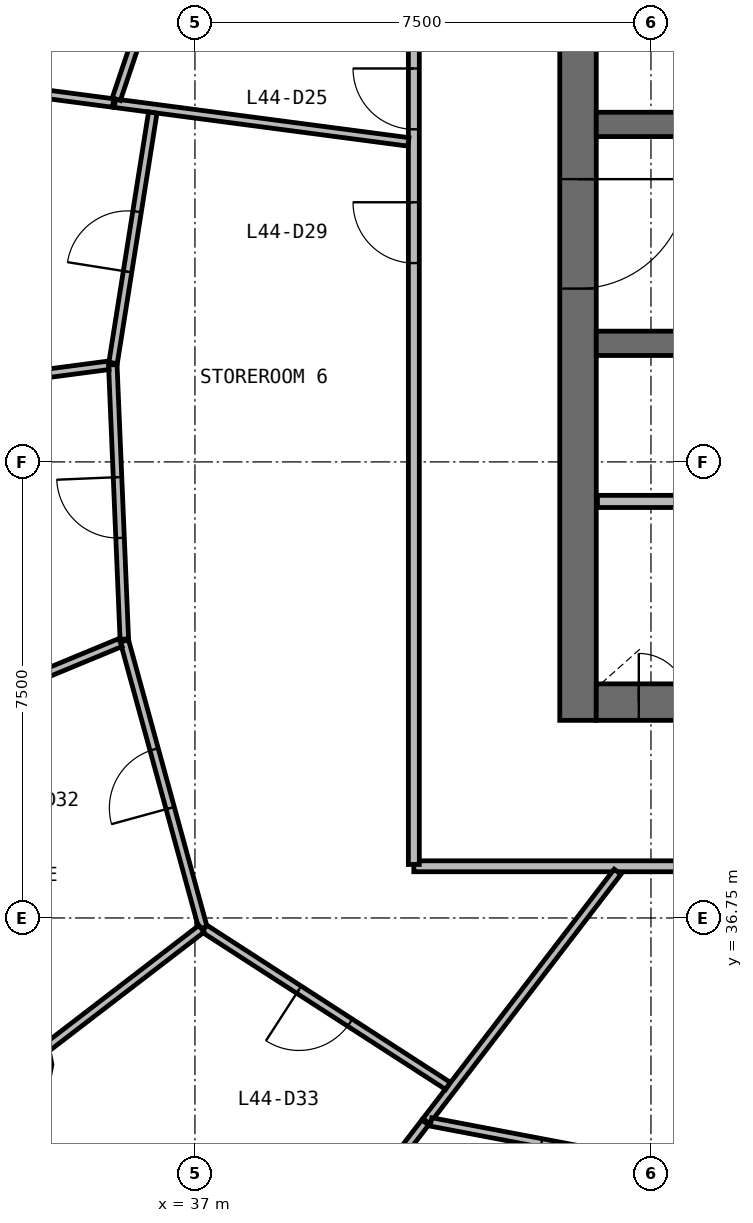
"""IFC4 building model, lengths in metres.
Left out: names, types, materials, properties, quantities, classifications, styles, units other than length and angle.
Written with IfcOpenShell. Run it as: python <this file> out.ifc"""

import sys

from ifc_helpers import new_model, si_unit, direction, frame, frame_2d, origin, place, context, subcontext, project, spatial, rectangle, extrude, source, transform, mapped, element, fill, save


model = new_model("IFC4")
c1 = context("Model", 3, precision=1e-05, world=origin(), true_north=direction((0.0, 1.0)))
c2 = subcontext(c1, "Body", "Model", "MODEL_VIEW")
j1 = project(units=[si_unit("LENGTHUNIT", "METRE"), si_unit("PLANEANGLEUNIT", "RADIAN")], contexts=[c1])
p1 = place(None, origin())
s1 = spatial("IfcSite", under=j1, at=p1, CompositionType="ELEMENT")
p2 = place(p1, origin())
s2 = spatial("IfcBuilding", under=s1, at=p2, CompositionType="ELEMENT")
p3 = place(p2, frame((0.0, 0.0, 183.8)))
s3 = spatial("IfcBuildingStorey", under=s2, at=p3, CompositionType="ELEMENT", Elevation=183.8)
p4 = place(p3, frame((43.3, 56.0, 0.0), z_axis=(0.0, 0.0, 1.0), x_axis=(0.0, -1.0, 0.0)))
e1 = element("IfcWall", 1, at=p4, inside=s3, PredefinedType="SHEAR", context=c2, shape_type="SweptSolid", body=[
    extrude(rectangle(XDim=16.0, YDim=0.6, at=frame_2d((8.0, 0.0))), origin(), (0.0, 0.0, 1.0), 3.9),
])
p5 = place(p4, frame((7.1, 0.0, 0.0)))
e2 = element("IfcOpeningElement", 2, at=p5, cuts=e1, PredefinedType="OPENING", context=c2, shape_type="SweptSolid", body=[
    extrude(rectangle(XDim=1.8, YDim=2.1, at=frame_2d((0.9, 1.05))), frame((0.0, 0.31, 0.0), z_axis=(0.0, -1.0, 0.0), x_axis=(1.0, 0.0, 0.0)), (0.0, 0.0, 1.0), 0.62),
])
p6 = place(p3, frame((43.6, 40.3, 0.0), z_axis=(0.0, 0.0, 1.0), x_axis=(1.0, 0.0, 0.0)))
e3 = element("IfcWall", 3, at=p6, inside=s3, PredefinedType="SHEAR", context=c2, shape_type="SweptSolid", body=[
    extrude(rectangle(XDim=16.8, YDim=0.6, at=frame_2d((8.4, 0.0))), origin(), (0.0, 0.0, 1.0), 3.9),
])
p7 = place(p6, frame((10.3, 0.0, 0.0)))
e4 = element("IfcOpeningElement", 4, at=p7, cuts=e3, PredefinedType="OPENING", context=c2, shape_type="SweptSolid", body=[
    extrude(rectangle(XDim=1.2, YDim=2.1, at=frame_2d((0.6, 1.05))), frame((0.0, 0.31, 0.0), z_axis=(0.0, -1.0, 0.0), x_axis=(1.0, 0.0, 0.0)), (0.0, 0.0, 1.0), 0.62),
])
p8 = place(p6, frame((7.25, 0.0, 0.0)))
e5 = element("IfcOpeningElement", 5, at=p8, cuts=e3, PredefinedType="OPENING", context=c2, shape_type="SweptSolid", body=[
    extrude(rectangle(XDim=1.1, YDim=2.1, at=frame_2d((0.55, 1.05))), frame((0.0, 0.31, 0.0), z_axis=(0.0, -1.0, 0.0), x_axis=(1.0, 0.0, 0.0)), (0.0, 0.0, 1.0), 0.62),
])
p9 = place(p6, frame((0.7, 0.0, 0.0)))
e6 = element("IfcOpeningElement", 6, at=p9, cuts=e3, PredefinedType="OPENING", context=c2, shape_type="SweptSolid", body=[
    extrude(rectangle(XDim=0.8, YDim=2.1, at=frame_2d((0.4, 1.05))), frame((0.0, 0.31, 0.0), z_axis=(0.0, -1.0, 0.0), x_axis=(1.0, 0.0, 0.0)), (0.0, 0.0, 1.0), 0.62),
])
p10 = place(p3, frame((43.6, 49.8, 0.0), z_axis=(0.0, 0.0, 1.0), x_axis=(1.0, 0.0, 0.0)))
e7 = element("IfcWall", 7, at=p10, inside=s3, PredefinedType="SHEAR", context=c2, shape_type="SweptSolid", body=[
    extrude(rectangle(XDim=16.8, YDim=0.4, at=frame_2d((8.4, 0.0))), origin(), (0.0, 0.0, 1.0), 3.9),
])
p11 = place(p10, frame((9.8, 0.0, 0.0)))
e8 = element("IfcOpeningElement", 8, at=p11, cuts=e7, PredefinedType="OPENING", context=c2, shape_type="SweptSolid", body=[
    extrude(rectangle(XDim=1.1, YDim=2.1, at=frame_2d((0.55, 1.05))), frame((0.0, 0.21, 0.0), z_axis=(0.0, -1.0, 0.0), x_axis=(1.0, 0.0, 0.0)), (0.0, 0.0, 1.0), 0.42),
])
p12 = place(p10, frame((12.3, 0.0, 0.0)))
e9 = element("IfcOpeningElement", 9, at=p12, cuts=e7, PredefinedType="OPENING", context=c2, shape_type="SweptSolid", body=[
    extrude(rectangle(XDim=1.1, YDim=2.1, at=frame_2d((0.55, 1.05))), frame((0.0, 0.21, 0.0), z_axis=(0.0, -1.0, 0.0), x_axis=(1.0, 0.0, 0.0)), (0.0, 0.0, 1.0), 0.42),
])
p13 = place(p10, frame((14.8, 0.0, 0.0)))
e10 = element("IfcOpeningElement", 10, at=p13, cuts=e7, PredefinedType="OPENING", context=c2, shape_type="SweptSolid", body=[
    extrude(rectangle(XDim=1.1, YDim=2.1, at=frame_2d((0.55, 1.05))), frame((0.0, 0.21, 0.0), z_axis=(0.0, -1.0, 0.0), x_axis=(1.0, 0.0, 0.0)), (0.0, 0.0, 1.0), 0.42),
])
p14 = place(p10, frame((4.45, 0.0, 0.0)))
e11 = element("IfcOpeningElement", 11, at=p14, cuts=e7, PredefinedType="OPENING", context=c2, shape_type="SweptSolid", body=[
    extrude(rectangle(XDim=0.9, YDim=2.1, at=frame_2d((0.45, 1.05))), frame((0.0, 0.21, 0.0), z_axis=(0.0, -1.0, 0.0), x_axis=(1.0, 0.0, 0.0)), (0.0, 0.0, 1.0), 0.42),
])
p15 = place(p10, frame((7.85, 0.0, 0.0)))
e12 = element("IfcOpeningElement", 12, at=p15, cuts=e7, PredefinedType="OPENING", context=c2, shape_type="SweptSolid", body=[
    extrude(rectangle(XDim=0.9, YDim=2.1, at=frame_2d((0.45, 1.05))), frame((0.0, 0.21, 0.0), z_axis=(0.0, -1.0, 0.0), x_axis=(1.0, 0.0, 0.0)), (0.0, 0.0, 1.0), 0.42),
])
p16 = place(p3, frame((43.6, 46.2, 0.0), z_axis=(0.0, 0.0, 1.0), x_axis=(1.0, 0.0, 0.0)))
e13 = element("IfcWall", 13, at=p16, inside=s3, PredefinedType="SHEAR", context=c2, shape_type="SweptSolid", body=[
    extrude(rectangle(XDim=16.8, YDim=0.4, at=frame_2d((8.4, 0.0))), origin(), (0.0, 0.0, 1.0), 3.9),
])
p17 = place(p16, frame((9.8, 0.0, 0.0)))
e14 = element("IfcOpeningElement", 14, at=p17, cuts=e13, PredefinedType="OPENING", context=c2, shape_type="SweptSolid", body=[
    extrude(rectangle(XDim=1.1, YDim=2.1, at=frame_2d((0.55, 1.05))), frame((0.0, 0.21, 0.0), z_axis=(0.0, -1.0, 0.0), x_axis=(1.0, 0.0, 0.0)), (0.0, 0.0, 1.0), 0.42),
])
p18 = place(p16, frame((12.3, 0.0, 0.0)))
e15 = element("IfcOpeningElement", 15, at=p18, cuts=e13, PredefinedType="OPENING", context=c2, shape_type="SweptSolid", body=[
    extrude(rectangle(XDim=1.1, YDim=2.1, at=frame_2d((0.55, 1.05))), frame((0.0, 0.21, 0.0), z_axis=(0.0, -1.0, 0.0), x_axis=(1.0, 0.0, 0.0)), (0.0, 0.0, 1.0), 0.42),
])
p19 = place(p16, frame((14.8, 0.0, 0.0)))
e16 = element("IfcOpeningElement", 16, at=p19, cuts=e13, PredefinedType="OPENING", context=c2, shape_type="SweptSolid", body=[
    extrude(rectangle(XDim=1.1, YDim=2.1, at=frame_2d((0.55, 1.05))), frame((0.0, 0.21, 0.0), z_axis=(0.0, -1.0, 0.0), x_axis=(1.0, 0.0, 0.0)), (0.0, 0.0, 1.0), 0.42),
])
p20 = place(p16, frame((7.85, 0.0, 0.0)))
e17 = element("IfcOpeningElement", 17, at=p20, cuts=e13, PredefinedType="OPENING", context=c2, shape_type="SweptSolid", body=[
    extrude(rectangle(XDim=0.9, YDim=2.1, at=frame_2d((0.45, 1.05))), frame((0.0, 0.21, 0.0), z_axis=(0.0, -1.0, 0.0), x_axis=(1.0, 0.0, 0.0)), (0.0, 0.0, 1.0), 0.42),
])
p21 = place(p3, frame((45.47, 43.6, 0.0), z_axis=(0.0, 0.0, 1.0), x_axis=(-1.0, 0.0, 0.0)))
e18 = element("IfcWall", 18, at=p21, inside=s3, PredefinedType="SOLIDWALL", context=c2, shape_type="SweptSolid", body=[
    extrude(rectangle(XDim=1.85, YDim=0.2, at=frame_2d((0.925, 0.0))), origin(), (0.0, 0.0, 1.0), 3.58),
])
p22 = place(p3, frame((63.4, 37.6, 0.0), z_axis=(0.0, 0.0, 1.0), x_axis=(-1.0, 0.0, 0.0)))
e19 = element("IfcWall", 19, at=p22, inside=s3, PredefinedType="PARTITIONING", context=c2, shape_type="SweptSolid", body=[
    extrude(rectangle(XDim=22.8, YDim=0.18, at=frame_2d((11.4, 0.0))), origin(), (0.0, 0.0, 1.0), 2.88),
])
p23 = place(p22, frame((10.95, 0.0, 0.0)))
e20 = element("IfcOpeningElement", 20, at=p23, cuts=e19, PredefinedType="OPENING", context=c2, shape_type="SweptSolid", body=[
    extrude(rectangle(XDim=1.0, YDim=2.1, at=frame_2d((0.5, 1.05))), frame((0.0, 0.1, 0.0), z_axis=(0.0, -1.0, 0.0), x_axis=(1.0, 0.0, 0.0)), (0.0, 0.0, 1.0), 0.2),
])
p24 = place(p22, frame((5.75, 0.0, 0.0)))
e21 = element("IfcOpeningElement", 21, at=p24, cuts=e19, PredefinedType="OPENING", context=c2, shape_type="SweptSolid", body=[
    extrude(rectangle(XDim=1.0, YDim=2.1, at=frame_2d((0.5, 1.05))), frame((0.0, 0.1, 0.0), z_axis=(0.0, -1.0, 0.0), x_axis=(1.0, 0.0, 0.0)), (0.0, 0.0, 1.0), 0.2),
])
p25 = place(p3, frame((40.6, 37.63, 0.0), z_axis=(0.0, 0.0, 1.0), x_axis=(0.0, 1.0, 0.0)))
e22 = element("IfcWall", 22, at=p25, inside=s3, PredefinedType="PARTITIONING", context=c2, shape_type="SweptSolid", body=[
    extrude(rectangle(XDim=20.74, YDim=0.18, at=frame_2d((10.37, 0.0))), origin(), (0.0, 0.0, 1.0), 2.88),
])
p26 = place(p25, frame((12.09, 0.0, 0.0)))
e23 = element("IfcOpeningElement", 23, at=p26, cuts=e22, PredefinedType="OPENING", context=c2, shape_type="SweptSolid", body=[
    extrude(rectangle(XDim=1.0, YDim=2.1, at=frame_2d((0.5, 1.05))), frame((0.0, 0.1, 0.0), z_axis=(0.0, -1.0, 0.0), x_axis=(1.0, 0.0, 0.0)), (0.0, 0.0, 1.0), 0.2),
])
p27 = place(p25, frame((9.89, 0.0, 0.0)))
e24 = element("IfcOpeningElement", 24, at=p27, cuts=e22, PredefinedType="OPENING", context=c2, shape_type="SweptSolid", body=[
    extrude(rectangle(XDim=1.0, YDim=2.1, at=frame_2d((0.5, 1.05))), frame((0.0, 0.1, 0.0), z_axis=(0.0, -1.0, 0.0), x_axis=(1.0, 0.0, 0.0)), (0.0, 0.0, 1.0), 0.2),
])
p28 = place(p3, frame((43.951, 37.51, 0.0), z_axis=(0.0, 0.0, 1.0), x_axis=(-0.608755854273, -0.793357617905, 0.0)))
e25 = element("IfcWall", 25, at=p28, inside=s3, PredefinedType="PARTITIONING", context=c2, shape_type="SweptSolid", body=[
    extrude(rectangle(XDim=5.167, YDim=0.14, at=frame_2d((2.583, 0.0))), origin(), (0.0, 0.0, 1.0), 2.88),
])
p29 = place(p3, frame((35.684, 50.148, 0.0), z_axis=(0.0, 0.0, 1.0), x_axis=(0.991441658538, -0.130550517866, 0.0)))
e26 = element("IfcWall", 26, at=p29, inside=s3, PredefinedType="PARTITIONING", context=c2, shape_type="SweptSolid", body=[
    extrude(rectangle(XDim=4.868, YDim=0.14, at=frame_2d((2.434, 0.0))), origin(), (0.0, 0.0, 1.0), 2.88),
])
p30 = place(p3, frame((37.131, 36.591, 0.0), z_axis=(0.0, 0.0, 1.0), x_axis=(-0.264211604104, 0.964464736658, 0.0)))
e27 = element("IfcWall", 27, at=p30, inside=s3, PredefinedType="PARTITIONING", context=c2, shape_type="SweptSolid", body=[
    extrude(rectangle(XDim=4.889, YDim=0.14, at=frame_2d((2.445, 0.0))), origin(), (0.0, 0.0, 1.0), 2.88),
])
p31 = place(p30, frame((2.039, 0.0, 0.0)))
e28 = element("IfcOpeningElement", 28, at=p31, cuts=e27, PredefinedType="OPENING", context=c2, shape_type="SweptSolid", body=[
    extrude(rectangle(XDim=1.0, YDim=2.1, at=frame_2d((0.5, 1.05))), frame((0.0, 0.08, 0.0), z_axis=(0.0, -1.0, 0.0), x_axis=(1.0, 0.0, 0.0)), (0.0, 0.0, 1.0), 0.16),
])
p32 = place(p3, frame((41.16, 33.989, 0.0), z_axis=(0.0, 0.0, 1.0), x_axis=(-0.840031596416, 0.542537479832, 0.0)))
e29 = element("IfcWall", 29, at=p32, inside=s3, PredefinedType="PARTITIONING", context=c2, shape_type="SweptSolid", body=[
    extrude(rectangle(XDim=4.766, YDim=0.14, at=frame_2d((2.383, 0.0))), origin(), (0.0, 0.0, 1.0), 2.88),
])
p33 = place(p32, frame((1.917, 0.0, 0.0)))
e30 = element("IfcOpeningElement", 30, at=p33, cuts=e29, PredefinedType="OPENING", context=c2, shape_type="SweptSolid", body=[
    extrude(rectangle(XDim=1.0, YDim=2.1, at=frame_2d((0.5, 1.05))), frame((0.0, 0.08, 0.0), z_axis=(0.0, -1.0, 0.0), x_axis=(1.0, 0.0, 0.0)), (0.0, 0.0, 1.0), 0.16),
])
p34 = place(p3, frame((45.581, 32.503, 0.0), z_axis=(0.0, 0.0, 1.0), x_axis=(-0.982412655338, 0.186722721253, 0.0)))
e31 = element("IfcWall", 31, at=p34, inside=s3, PredefinedType="PARTITIONING", context=c2, shape_type="SweptSolid", body=[
    extrude(rectangle(XDim=4.783, YDim=0.14, at=frame_2d((2.392, 0.0))), origin(), (0.0, 0.0, 1.0), 2.88),
])
p35 = place(p34, frame((1.933, 0.0, 0.0)))
e32 = element("IfcOpeningElement", 32, at=p35, cuts=e31, PredefinedType="OPENING", context=c2, shape_type="SweptSolid", body=[
    extrude(rectangle(XDim=1.0, YDim=2.1, at=frame_2d((0.5, 1.05))), frame((0.0, 0.08, 0.0), z_axis=(0.0, -1.0, 0.0), x_axis=(1.0, 0.0, 0.0)), (0.0, 0.0, 1.0), 0.16),
])
p36 = place(p3, frame((35.838, 41.336, 0.0), z_axis=(0.0, 0.0, 1.0), x_axis=(-0.042012878169, 0.999117069251, 0.0)))
e33 = element("IfcWall", 33, at=p36, inside=s3, PredefinedType="PARTITIONING", context=c2, shape_type="SweptSolid", body=[
    extrude(rectangle(XDim=4.515, YDim=0.14, at=frame_2d((2.258, 0.0))), origin(), (0.0, 0.0, 1.0), 2.88),
])
p37 = place(p36, frame((1.665, 0.0, 0.0)))
e34 = element("IfcOpeningElement", 34, at=p37, cuts=e33, PredefinedType="OPENING", context=c2, shape_type="SweptSolid", body=[
    extrude(rectangle(XDim=1.0, YDim=2.1, at=frame_2d((0.5, 1.05))), frame((0.0, 0.08, 0.0), z_axis=(0.0, -1.0, 0.0), x_axis=(1.0, 0.0, 0.0)), (0.0, 0.0, 1.0), 0.16),
])
p38 = place(p3, frame((35.774, 41.279, 0.0), z_axis=(0.0, 0.0, 1.0), x_axis=(-0.923885643911, -0.382668677808, 0.0)))
e35 = element("IfcWall", 35, at=p38, inside=s3, PredefinedType="PARTITIONING", context=c2, shape_type="SweptSolid", body=[
    extrude(rectangle(XDim=4.446, YDim=0.14, at=frame_2d((2.223, 0.0))), origin(), (0.0, 0.0, 1.0), 2.88),
])
p39 = place(p3, frame((35.579, 45.838, 0.0), z_axis=(0.0, 0.0, 1.0), x_axis=(-0.991444463544, -0.130529214005, 0.0)))
e36 = element("IfcWall", 36, at=p39, inside=s3, PredefinedType="PARTITIONING", context=c2, shape_type="SweptSolid", body=[
    extrude(rectangle(XDim=4.227, YDim=0.14, at=frame_2d((2.114, 0.0))), origin(), (0.0, 0.0, 1.0), 2.88),
])
p40 = place(p3, frame((35.653, 45.877, 0.0), z_axis=(0.0, 0.0, 1.0), x_axis=(0.15660891281, 0.98766069499, 0.0)))
e37 = element("IfcWall", 37, at=p40, inside=s3, PredefinedType="PARTITIONING", context=c2, shape_type="SweptSolid", body=[
    extrude(rectangle(XDim=4.17, YDim=0.14, at=frame_2d((2.085, 0.0))), origin(), (0.0, 0.0, 1.0), 2.88),
])
p41 = place(p40, frame((1.52, 0.0, 0.0)))
e38 = element("IfcOpeningElement", 38, at=p41, cuts=e37, PredefinedType="OPENING", context=c2, shape_type="SweptSolid", body=[
    extrude(rectangle(XDim=1.0, YDim=2.1, at=frame_2d((0.5, 1.05))), frame((0.0, 0.08, 0.0), z_axis=(0.0, -1.0, 0.0), x_axis=(1.0, 0.0, 0.0)), (0.0, 0.0, 1.0), 0.16),
])
p42 = place(p3, frame((35.707, 50.216, 0.0), z_axis=(0.0, 0.0, 1.0), x_axis=(0.319319104698, 0.947647249442, 0.0)))
e39 = element("IfcWall", 39, at=p42, inside=s3, PredefinedType="PARTITIONING", context=c2, shape_type="SweptSolid", body=[
    extrude(rectangle(XDim=4.168, YDim=0.14, at=frame_2d((2.084, 0.0))), origin(), (0.0, 0.0, 1.0), 2.88),
])
p43 = place(p42, frame((1.518, 0.0, 0.0)))
e40 = element("IfcOpeningElement", 40, at=p43, cuts=e39, PredefinedType="OPENING", context=c2, shape_type="SweptSolid", body=[
    extrude(rectangle(XDim=1.0, YDim=2.1, at=frame_2d((0.5, 1.05))), frame((0.0, 0.08, 0.0), z_axis=(0.0, -1.0, 0.0), x_axis=(1.0, 0.0, 0.0)), (0.0, 0.0, 1.0), 0.16),
])
p44 = place(p3, frame((32.87, 50.519, 0.0), z_axis=(0.0, 0.0, 1.0), x_axis=(0.991450448598, -0.130483746019, 0.0)))
e41 = element("IfcWall", 41, at=p44, inside=s3, PredefinedType="PARTITIONING", context=c2, shape_type="SweptSolid", body=[
    extrude(rectangle(XDim=2.808, YDim=0.14, at=frame_2d((1.404, 0.0))), origin(), (0.0, 0.0, 1.0), 2.88),
])
p45 = place(p3, frame((37.107, 36.573, 0.0), z_axis=(0.0, 0.0, 1.0), x_axis=(-0.79334944096, -0.608766510683, 0.0)))
e42 = element("IfcWall", 42, at=p45, inside=s3, PredefinedType="PARTITIONING", context=c2, shape_type="SweptSolid", body=[
    extrude(rectangle(XDim=3.213, YDim=0.14, at=frame_2d((1.606, 0.0))), origin(), (0.0, 0.0, 1.0), 2.88),
])
p46 = place(p3, frame((40.787, 33.387, 0.0), z_axis=(0.0, 0.0, 1.0), x_axis=(-0.608778925589, -0.793339914386, 0.0)))
e43 = element("IfcWall", 43, at=p46, inside=s3, PredefinedType="PARTITIONING", context=c2, shape_type="SweptSolid", body=[
    extrude(rectangle(XDim=2.331, YDim=0.14, at=frame_2d((1.166, 0.0))), origin(), (0.0, 0.0, 1.0), 2.88),
])
m1 = source(origin(), c2, "Body", "SweptSolid", [
    extrude(rectangle(XDim=1.8, YDim=2.1, at=frame_2d((0.9, 1.05))), frame((0.0, 0.025, 0.0), z_axis=(0.0, -1.0, 0.0), x_axis=(1.0, 0.0, 0.0)), (0.0, 0.0, 1.0), 0.05),
])
p47 = place(p5, origin())
e44 = element("IfcDoor", 44, at=p47, inside=s3, OperationType="SINGLE_SWING_LEFT", PredefinedType="DOOR", context=c2, shape_type="MappedRepresentation", body=[
    mapped(m1, transform((0.0, 0.0, 0.0), scale=1.0)),
])
fill(e2, e44)
m2 = source(origin(), c2, "Body", "SweptSolid", [
    extrude(rectangle(XDim=0.8, YDim=2.1, at=frame_2d((0.4, 1.05))), frame((0.0, 0.025, 0.0), z_axis=(0.0, -1.0, 0.0), x_axis=(1.0, 0.0, 0.0)), (0.0, 0.0, 1.0), 0.05),
])
p48 = place(p9, origin())
e45 = element("IfcDoor", 45, at=p48, inside=s3, OperationType="SINGLE_SWING_LEFT", PredefinedType="DOOR", context=c2, shape_type="MappedRepresentation", body=[
    mapped(m2, transform((0.0, 0.0, 0.0), scale=1.0)),
])
fill(e6, e45)
m3 = source(origin(), c2, "Body", "SweptSolid", [
    extrude(rectangle(XDim=1.0, YDim=2.1, at=frame_2d((0.5, 1.05))), frame((0.0, 0.025, 0.0), z_axis=(0.0, -1.0, 0.0), x_axis=(1.0, 0.0, 0.0)), (0.0, 0.0, 1.0), 0.05),
])
p49 = place(p26, origin())
e46 = element("IfcDoor", 46, at=p49, inside=s3, OperationType="SINGLE_SWING_RIGHT", PredefinedType="DOOR", context=c2, shape_type="MappedRepresentation", body=[
    mapped(m3, transform((0.0, 0.0, 0.0), scale=1.0)),
])
fill(e23, e46)
p50 = place(p27, origin())
e47 = element("IfcDoor", 47, at=p50, inside=s3, OperationType="SINGLE_SWING_RIGHT", PredefinedType="DOOR", context=c2, shape_type="MappedRepresentation", body=[
    mapped(m3, transform((0.0, 0.0, 0.0), scale=1.0)),
])
fill(e24, e47)
p51 = place(p41, origin())
e48 = element("IfcDoor", 48, at=p51, inside=s3, OperationType="SINGLE_SWING_LEFT", PredefinedType="DOOR", context=c2, shape_type="MappedRepresentation", body=[
    mapped(m3, transform((0.0, 0.0, 0.0), scale=1.0)),
])
fill(e38, e48)
p52 = place(p37, origin())
e49 = element("IfcDoor", 49, at=p52, inside=s3, OperationType="SINGLE_SWING_RIGHT", PredefinedType="DOOR", context=c2, shape_type="MappedRepresentation", body=[
    mapped(m3, transform((0.0, 0.0, 0.0), scale=1.0)),
])
fill(e34, e49)
p53 = place(p31, origin())
e50 = element("IfcDoor", 50, at=p53, inside=s3, OperationType="SINGLE_SWING_LEFT", PredefinedType="DOOR", context=c2, shape_type="MappedRepresentation", body=[
    mapped(m3, transform((0.0, 0.0, 0.0), scale=1.0)),
])
fill(e28, e50)
p54 = place(p33, origin())
e51 = element("IfcDoor", 51, at=p54, inside=s3, OperationType="SINGLE_SWING_RIGHT", PredefinedType="DOOR", context=c2, shape_type="MappedRepresentation", body=[
    mapped(m3, transform((0.0, 0.0, 0.0), scale=1.0)),
])
fill(e30, e51)
p55 = place(p35, origin())
e52 = element("IfcDoor", 52, at=p55, inside=s3, OperationType="SINGLE_SWING_RIGHT", PredefinedType="DOOR", context=c2, shape_type="MappedRepresentation", body=[
    mapped(m3, transform((0.0, 0.0, 0.0), scale=1.0)),
])
fill(e32, e52)
save(model, sys.argv[1])
